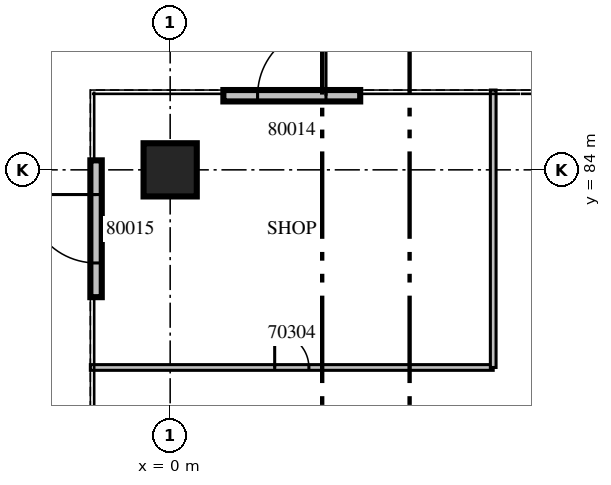
"""IFC4 building model, lengths in metres.
Left out: names, types, materials, properties, quantities, classifications, styles, units other than length and angle.
Written with IfcOpenShell. Run it as: python <this file> out.ifc"""

import sys

from ifc_helpers import new_model, si_unit, direction, frame, frame_2d, origin, origin_2d, place, context, subcontext, project, spatial, rectangle, extrude, source, transform, mapped, element, fill, save


model = new_model("IFC4")
c1 = context("Model", 3, precision=1e-05, world=origin(), true_north=direction((0.0, 1.0)))
c2 = subcontext(c1, "Body", "Model", "MODEL_VIEW")
j1 = project(units=[si_unit("LENGTHUNIT", "METRE"), si_unit("PLANEANGLEUNIT", "RADIAN")], contexts=[c1])
p1 = place(None, origin())
s1 = spatial("IfcSite", under=j1, at=p1, CompositionType="ELEMENT")
p2 = place(p1, origin())
s2 = spatial("IfcBuilding", under=s1, at=p2, CompositionType="ELEMENT")
p3 = place(p2, origin())
s3 = spatial("IfcBuildingStorey", under=s2, at=p3, CompositionType="ELEMENT", Elevation=0.0)
m1 = source(origin(), c2, "Body", "SweptSolid", [
    extrude(rectangle(XDim=1.4, YDim=1.4, at=origin_2d()), origin(), (0.0, 0.0, 1.0), 7.5),
])
p4 = place(p3, frame((0.0, 84.0, 0.0), z_axis=(0.0, 0.0, 1.0), x_axis=(1.0, 0.0, 0.0)))
e1 = element("IfcColumn", 1, at=p4, inside=s3, PredefinedType="COLUMN", context=c2, shape_type="MappedRepresentation", body=[
    mapped(m1, transform((0.0, 0.0, 0.0), scale=1.0)),
])
m2 = source(origin(), c2, "Body", "SweptSolid", [
    extrude(rectangle(XDim=3.6, YDim=0.3, at=frame_2d((1.8, 0.0))), origin(), (0.0, 0.0, 1.0), 6.9),
])
p5 = place(p3, frame((5.0, 85.95, 0.0), z_axis=(0.0, 0.0, 1.0), x_axis=(-1.0, 0.0, 0.0)))
e2 = element("IfcWall", 2, at=p5, inside=s3, PredefinedType="STANDARD", context=c2, shape_type="MappedRepresentation", body=[
    mapped(m2, transform((0.0, 0.0, 0.0), scale=1.0)),
])
m3 = source(origin(), c2, "Body", "SweptSolid", [
    extrude(rectangle(XDim=1.8, YDim=2.4, at=frame_2d((0.9, 1.2))), frame((0.0, 0.16, 0.0), z_axis=(0.0, -1.0, 0.0), x_axis=(1.0, 0.0, 0.0)), (0.0, 0.0, 1.0), 0.32),
])
p6 = place(p5, frame((0.9, 0.0, 0.0)))
e3 = element("IfcOpeningElement", 3, at=p6, cuts=e2, PredefinedType="OPENING", context=c2, shape_type="MappedRepresentation", body=[
    mapped(m3, transform((0.0, 0.0, 0.0), scale=1.0)),
])
p7 = place(p3, frame((-1.95, 84.25, 0.0), z_axis=(0.0, 0.0, 1.0), x_axis=(0.0, -1.0, 0.0)))
e4 = element("IfcWall", 4, at=p7, inside=s3, PredefinedType="STANDARD", context=c2, shape_type="MappedRepresentation", body=[
    mapped(m2, transform((0.0, 0.0, 0.0), scale=1.0)),
])
p8 = place(p7, frame((0.9, 0.0, 0.0)))
e5 = element("IfcOpeningElement", 5, at=p8, cuts=e4, PredefinedType="OPENING", context=c2, shape_type="MappedRepresentation", body=[
    mapped(m3, transform((0.0, 0.0, 0.0), scale=1.0)),
])
m4 = source(origin(), c2, "Body", "SweptSolid", [
    extrude(rectangle(XDim=10.6, YDim=0.15, at=frame_2d((5.3, 0.0))), origin(), (0.0, 0.0, 1.0), 6.9),
])
p9 = place(p3, frame((-2.1, 78.8, 0.0), z_axis=(0.0, 0.0, 1.0), x_axis=(1.0, 0.0, 0.0)))
e6 = element("IfcWall", 6, at=p9, inside=s3, PredefinedType="PARTITIONING", context=c2, shape_type="MappedRepresentation", body=[
    mapped(m4, transform((0.0, 0.0, 0.0), scale=1.0)),
])
m5 = source(origin(), c2, "Body", "SweptSolid", [
    extrude(rectangle(XDim=0.9, YDim=2.1, at=frame_2d((0.45, 1.05))), frame((0.0, 0.085, 0.0), z_axis=(0.0, -1.0, 0.0), x_axis=(1.0, 0.0, 0.0)), (0.0, 0.0, 1.0), 0.17),
])
p10 = place(p9, frame((4.85, 0.0, 0.0)))
e7 = element("IfcOpeningElement", 7, at=p10, cuts=e6, PredefinedType="OPENING", context=c2, shape_type="MappedRepresentation", body=[
    mapped(m5, transform((0.0, 0.0, 0.0), scale=1.0)),
])
m6 = source(origin(), c2, "Body", "SweptSolid", [
    extrude(rectangle(XDim=7.3, YDim=0.15, at=frame_2d((3.65, 0.0))), origin(), (0.0, 0.0, 1.0), 6.9),
])
p11 = place(p3, frame((8.5, 78.8, 0.0), z_axis=(0.0, 0.0, 1.0), x_axis=(0.0, 1.0, 0.0)))
e8 = element("IfcWall", 8, at=p11, inside=s3, PredefinedType="PARTITIONING", context=c2, shape_type="MappedRepresentation", body=[
    mapped(m6, transform((0.0, 0.0, 0.0), scale=1.0)),
])
m7 = source(origin(), c2, "Body", "SweptSolid", [
    extrude(rectangle(XDim=1.8, YDim=2.4, at=frame_2d((0.9, 1.2))), frame((0.0, 0.025, 0.0), z_axis=(0.0, -1.0, 0.0), x_axis=(1.0, 0.0, 0.0)), (0.0, 0.0, 1.0), 0.05),
])
p12 = place(p6, origin())
e9 = element("IfcDoor", 9, at=p12, inside=s3, OperationType="DOUBLE_DOOR_SINGLE_SWING", PredefinedType="DOOR", context=c2, shape_type="MappedRepresentation", body=[
    mapped(m7, transform((0.0, 0.0, 0.0), scale=1.0)),
])
fill(e3, e9)
p13 = place(p8, origin())
e10 = element("IfcDoor", 10, at=p13, inside=s3, OperationType="DOUBLE_DOOR_SINGLE_SWING", PredefinedType="DOOR", context=c2, shape_type="MappedRepresentation", body=[
    mapped(m7, transform((0.0, 0.0, 0.0), scale=1.0)),
])
fill(e5, e10)
m8 = source(origin(), c2, "Body", "SweptSolid", [
    extrude(rectangle(XDim=0.9, YDim=2.1, at=frame_2d((0.45, 1.05))), frame((0.0, 0.025, 0.0), z_axis=(0.0, -1.0, 0.0), x_axis=(1.0, 0.0, 0.0)), (0.0, 0.0, 1.0), 0.05),
])
p14 = place(p10, origin())
e11 = element("IfcDoor", 11, at=p14, inside=s3, OperationType="SINGLE_SWING_LEFT", PredefinedType="DOOR", context=c2, shape_type="MappedRepresentation", body=[
    mapped(m8, transform((0.0, 0.0, 0.0), scale=1.0)),
])
fill(e7, e11)
save(model, sys.argv[1])
